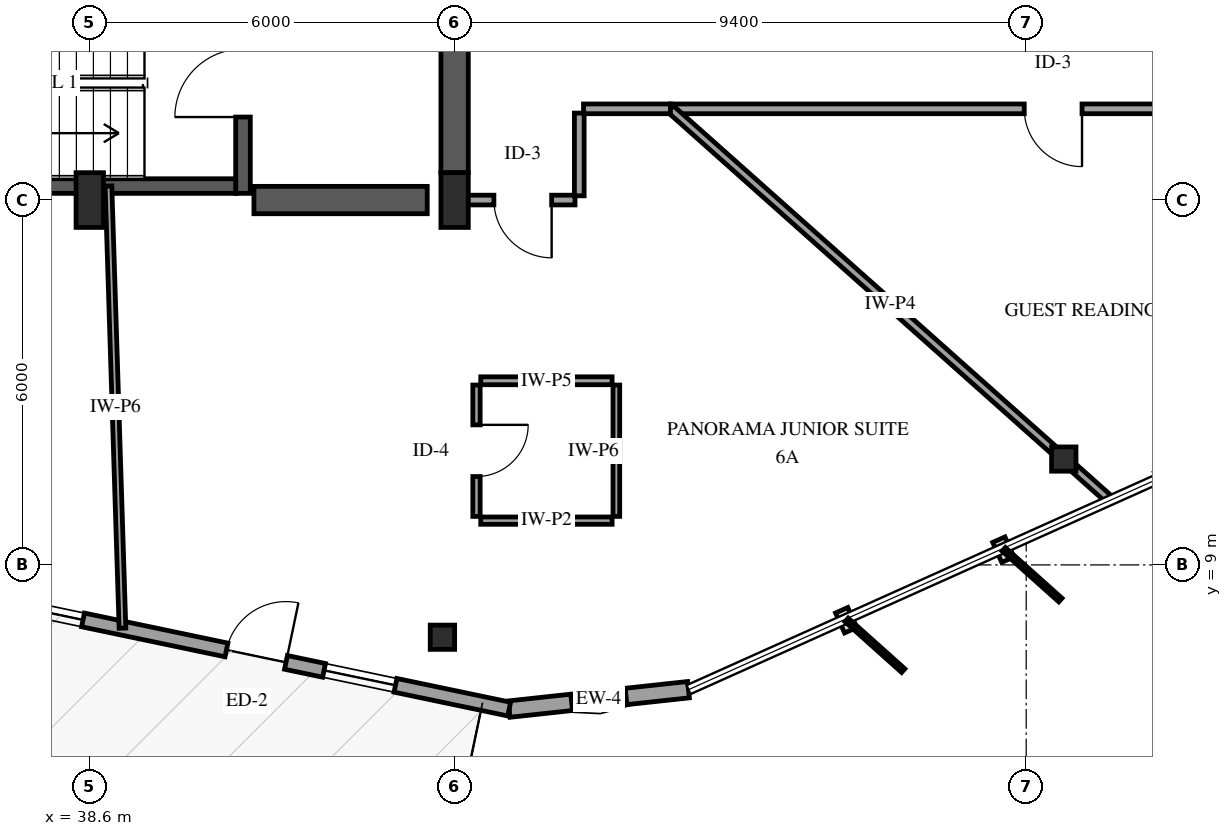
"""IFC4 building model, lengths in metres.
Left out: names, types, materials, properties, quantities, classifications, styles, units other than length and angle.
Written with IfcOpenShell. Run it as: python <this file> out.ifc"""

import sys

from ifc_helpers import new_model, si_unit, direction, frame, frame_2d, origin, origin_2d, place, context, subcontext, project, spatial, rectangle, i_section, extrude, element, fill, save


model = new_model("IFC4")
c1 = context("Model", 3, precision=1e-05, world=origin(), true_north=direction((0.0, 1.0)))
c2 = subcontext(c1, "Body", "Model", "MODEL_VIEW")
j1 = project(units=[si_unit("LENGTHUNIT", "METRE"), si_unit("PLANEANGLEUNIT", "RADIAN")], contexts=[c1])
p1 = place(None, origin())
s1 = spatial("IfcSite", under=j1, at=p1, CompositionType="ELEMENT")
p2 = place(p1, origin())
s2 = spatial("IfcBuilding", under=s1, at=p2, CompositionType="ELEMENT")
p3 = place(p2, frame((0.0, 0.0, 253.75)))
s3 = spatial("IfcBuildingStorey", under=s2, at=p3, CompositionType="ELEMENT", Elevation=253.75)
p4 = place(p3, frame((41.12, 15.11, 0.0), z_axis=(0.0, 0.0, 1.0), x_axis=(0.0, 1.0, 0.0)))
e1 = element("IfcWall", 1, at=p4, inside=s3, PredefinedType="SHEAR", context=c2, shape_type="SweptSolid", body=[
    extrude(rectangle(XDim=3.63, YDim=0.24, at=frame_2d((1.815, 0.0))), origin(), (0.0, 0.0, 1.0), 3.75),
])
p5 = place(p4, frame((1.255, 0.0, 0.0)))
e2 = element("IfcOpeningElement", 2, at=p5, cuts=e1, PredefinedType="OPENING", context=c2, shape_type="SweptSolid", body=[
    extrude(rectangle(XDim=1.12, YDim=2.15, at=frame_2d((0.56, 1.075))), frame((0.0, 0.13, 0.0), z_axis=(0.0, -1.0, 0.0), x_axis=(1.0, 0.0, 0.0)), (0.0, 0.0, 1.0), 0.26),
])
p6 = place(p3, frame((33.0, 15.23, 0.0), z_axis=(0.0, 0.0, 1.0), x_axis=(1.0, 0.0, 0.0)))
e3 = element("IfcWall", 3, at=p6, inside=s3, PredefinedType="SHEAR", context=c2, shape_type="SweptSolid", body=[
    extrude(rectangle(XDim=8.0, YDim=0.24, at=frame_2d((4.0, 0.0))), origin(), (0.0, 0.0, 1.0), 3.75),
])
p7 = place(p3, frame((41.3, 15.0, 0.0), z_axis=(0.0, 0.0, 1.0), x_axis=(1.0, 0.0, 0.0)))
e4 = element("IfcWall", 4, at=p7, inside=s3, PredefinedType="SHEAR", context=c2, shape_type="SweptSolid", body=[
    extrude(rectangle(XDim=2.85, YDim=0.45, at=frame_2d((1.425, 0.0))), origin(), (0.0, 0.0, 1.0), 3.75),
])
p8 = place(p3, frame((44.6, 15.45, 0.0), z_axis=(0.0, 0.0, 1.0), x_axis=(0.0, 1.0, 0.0)))
e5 = element("IfcWall", 5, at=p8, inside=s3, PredefinedType="SHEAR", context=c2, shape_type="SweptSolid", body=[
    extrude(rectangle(XDim=6.35, YDim=0.45, at=frame_2d((3.175, 0.0))), origin(), (0.0, 0.0, 1.0), 3.75),
])
for number, where, z_axis, x_axis in (
    (6, (38.6, 15.0, 0.0), (0.0, 0.0, 1.0), (1.0, 0.0, 0.0)),
    (7, (44.6, 15.0, 0.0), (0.0, 0.0, 1.0), (1.0, 0.0, 0.0)),
):
    element("IfcColumn", number, at=place(p3, frame(where, z_axis=z_axis, x_axis=x_axis)), inside=s3, PredefinedType="PILASTER", context=c2, shape_type="SweptSolid", body=[
        extrude(rectangle(XDim=0.45, YDim=0.9, at=origin_2d()), origin(), (0.0, 0.0, 1.0), 3.75),
    ])
for number, where, z_axis, x_axis in (
    (8, (44.4, 7.811, 0.0), (0.0, 0.0, 1.0), (1.0, 0.0, 0.0)),
    (9, (54.618, 10.74, 0.0), (0.0, 0.0, 1.0), (1.0, 0.0, 0.0)),
):
    element("IfcColumn", number, at=place(p3, frame(where, z_axis=z_axis, x_axis=x_axis)), inside=s3, PredefinedType="COLUMN", context=c2, shape_type="SweptSolid", body=[
        extrude(i_section(OverallWidth=0.401, OverallDepth=0.399, WebThickness=0.025, FlangeThickness=0.04, FilletRadius=0.038, at=origin_2d()), origin(), (0.0, 0.0, 1.0), 3.75),
    ])
p9 = place(p3, frame((45.497, 6.629, 0.0), z_axis=(0.0, 0.0, 1.0), x_axis=(0.994188969029, 0.107648938037, 0.0)))
e10 = element("IfcWall", 10, at=p9, inside=s3, PredefinedType="SOLIDWALL", context=c2, shape_type="SweptSolid", body=[
    extrude(rectangle(XDim=2.967, YDim=0.27, at=frame_2d((1.483, 0.0))), origin(), (0.0, 0.0, 1.0), 2.829),
])
p10 = place(p9, frame((1.033, 0.0, 0.75)))
e11 = element("IfcOpeningElement", 11, at=p10, cuts=e10, PredefinedType="OPENING", context=c2, shape_type="SweptSolid", body=[
    extrude(rectangle(XDim=0.9, YDim=1.5, at=frame_2d((0.45, 0.75))), frame((0.0, 0.145, 0.0), z_axis=(0.0, -1.0, 0.0), x_axis=(1.0, 0.0, 0.0)), (0.0, 0.0, 1.0), 0.29),
])
p11 = place(p3, frame((37.178, 8.37, 0.0), z_axis=(0.0, 0.0, 1.0), x_axis=(0.978792902195, -0.204852275096, 0.0)))
e12 = element("IfcWall", 12, at=p11, inside=s3, PredefinedType="SOLIDWALL", context=c2, shape_type="SweptSolid", body=[
    extrude(rectangle(XDim=8.5, YDim=0.23, at=frame_2d((4.25, 0.0))), origin(), (0.0, 0.0, 1.0), 2.829),
])
p12 = place(p11, frame((3.75, 0.0, 0.0)))
e13 = element("IfcOpeningElement", 13, at=p12, cuts=e12, PredefinedType="OPENING", context=c2, shape_type="SweptSolid", body=[
    extrude(rectangle(XDim=1.0, YDim=2.15, at=frame_2d((0.5, 1.075))), frame((0.0, 0.125, 0.0), z_axis=(0.0, -1.0, 0.0), x_axis=(1.0, 0.0, 0.0)), (0.0, 0.0, 1.0), 0.25),
])
p13 = place(p11, frame((0.44, 0.0, 0.72)))
e14 = element("IfcOpeningElement", 14, at=p13, cuts=e12, PredefinedType="OPENING", context=c2, shape_type="SweptSolid", body=[
    extrude(rectangle(XDim=0.9, YDim=1.5, at=frame_2d((0.45, 0.75))), frame((0.0, 0.125, 0.0), z_axis=(0.0, -1.0, 0.0), x_axis=(1.0, 0.0, 0.0)), (0.0, 0.0, 1.0), 0.25),
])
p14 = place(p11, frame((5.39, 0.0, 0.72)))
e15 = element("IfcOpeningElement", 15, at=p14, cuts=e12, PredefinedType="OPENING", context=c2, shape_type="SweptSolid", body=[
    extrude(rectangle(XDim=1.2, YDim=1.6, at=frame_2d((0.6, 0.8))), frame((0.0, 0.125, 0.0), z_axis=(0.0, -1.0, 0.0), x_axis=(1.0, 0.0, 0.0)), (0.0, 0.0, 1.0), 0.25),
])
p15 = place(p3, frame((60.737, 16.5, 0.0), z_axis=(0.0, 0.0, 1.0), x_axis=(-1.0, 0.0, 0.0)))
e16 = element("IfcWall", 16, at=p15, inside=s3, PredefinedType="PARTITIONING", context=c2, shape_type="SweptSolid", body=[
    extrude(rectangle(XDim=12.588, YDim=0.16, at=frame_2d((6.294, 0.0))), origin(), (0.0, 0.0, 1.0), 3.45),
])
p16 = place(p15, frame((5.819, 0.0, 0.0)))
e17 = element("IfcOpeningElement", 17, at=p16, cuts=e16, PredefinedType="OPENING", context=c2, shape_type="SweptSolid", body=[
    extrude(rectangle(XDim=0.95, YDim=2.15, at=frame_2d((0.475, 1.075))), frame((0.0, 0.09, 0.0), z_axis=(0.0, -1.0, 0.0), x_axis=(1.0, 0.0, 0.0)), (0.0, 0.0, 1.0), 0.18),
])
p17 = place(p3, frame((48.149, 16.5, 0.0), z_axis=(0.0, 0.0, 1.0), x_axis=(0.74692778728, -0.664905166613, 0.0)))
e18 = element("IfcWall", 18, at=p17, inside=s3, PredefinedType="PARTITIONING", context=c2, shape_type="SweptSolid", body=[
    extrude(rectangle(XDim=9.683, YDim=0.14, at=frame_2d((4.841, 0.0))), origin(), (0.0, 0.0, 1.0), 2.828),
])
p18 = place(p3, frame((38.908, 15.23, 0.0), z_axis=(0.0, 0.0, 1.0), x_axis=(0.031618275785, -0.999500017327, 0.0)))
e19 = element("IfcWall", 19, at=p18, inside=s3, PredefinedType="PARTITIONING", context=c2, shape_type="SweptSolid", body=[
    extrude(rectangle(XDim=7.274, YDim=0.11, at=frame_2d((3.637, 0.0))), origin(), (0.0, 0.0, 1.0), 3.45),
])
p19 = place(p3, frame((44.96, 11.958, 0.0), z_axis=(0.0, 0.0, 1.0), x_axis=(0.0, -1.0, 0.0)))
e20 = element("IfcWall", 20, at=p19, inside=s3, PredefinedType="PARTITIONING", context=c2, shape_type="SweptSolid", body=[
    extrude(rectangle(XDim=2.16, YDim=0.12, at=frame_2d((1.08, 0.0))), origin(), (0.0, 0.0, 1.0), 2.828),
])
p20 = place(p19, frame((0.655, 0.0, 0.0)))
e21 = element("IfcOpeningElement", 21, at=p20, cuts=e20, PredefinedType="OPENING", context=c2, shape_type="SweptSolid", body=[
    extrude(rectangle(XDim=0.85, YDim=2.1, at=frame_2d((0.425, 1.05))), frame((0.0, 0.07, 0.0), z_axis=(0.0, -1.0, 0.0), x_axis=(1.0, 0.0, 0.0)), (0.0, 0.0, 1.0), 0.14),
])
p21 = place(p3, frame((47.26, 9.798, 0.0), z_axis=(0.0, 0.0, 1.0), x_axis=(0.0, 1.0, 0.0)))
e22 = element("IfcWall", 22, at=p21, inside=s3, PredefinedType="PARTITIONING", context=c2, shape_type="SweptSolid", body=[
    extrude(rectangle(XDim=2.16, YDim=0.11, at=frame_2d((1.08, 0.0))), origin(), (0.0, 0.0, 1.0), 3.45),
])
p22 = place(p3, frame((47.19, 12.028, 0.0), z_axis=(0.0, 0.0, 1.0), x_axis=(-1.0, 0.0, 0.0)))
e23 = element("IfcWall", 23, at=p22, inside=s3, PredefinedType="PARTITIONING", context=c2, shape_type="SweptSolid", body=[
    extrude(rectangle(XDim=2.16, YDim=0.13, at=frame_2d((1.08, 0.0))), origin(), (0.0, 0.0, 1.0), 3.45),
])
p23 = place(p3, frame((45.03, 9.728, 0.0), z_axis=(0.0, 0.0, 1.0), x_axis=(1.0, 0.0, 0.0)))
e24 = element("IfcWall", 24, at=p23, inside=s3, PredefinedType="PARTITIONING", context=c2, shape_type="SweptSolid", body=[
    extrude(rectangle(XDim=2.16, YDim=0.12, at=frame_2d((1.08, 0.0))), origin(), (0.0, 0.0, 1.0), 3.45),
])
p24 = place(p3, frame((46.58, 15.0, 0.0), z_axis=(0.0, 0.0, 1.0), x_axis=(-1.0, 0.0, 0.0)))
e25 = element("IfcWall", 25, at=p24, inside=s3, PredefinedType="PARTITIONING", context=c2, shape_type="SweptSolid", body=[
    extrude(rectangle(XDim=1.91, YDim=0.16, at=frame_2d((0.955, 0.0))), origin(), (0.0, 0.0, 1.0), 3.45),
])
p25 = place(p24, frame((0.384, 0.0, 0.0)))
e26 = element("IfcOpeningElement", 26, at=p25, cuts=e25, PredefinedType="OPENING", context=c2, shape_type="SweptSolid", body=[
    extrude(rectangle(XDim=0.95, YDim=2.15, at=frame_2d((0.475, 1.075))), frame((0.0, 0.09, 0.0), z_axis=(0.0, -1.0, 0.0), x_axis=(1.0, 0.0, 0.0)), (0.0, 0.0, 1.0), 0.18),
])
p26 = place(p3, frame((48.149, 16.5, 0.0), z_axis=(0.0, 0.0, 1.0), x_axis=(-1.0, 0.0, 0.0)))
e27 = element("IfcWall", 27, at=p26, inside=s3, PredefinedType="PARTITIONING", context=c2, shape_type="SweptSolid", body=[
    extrude(rectangle(XDim=1.429, YDim=0.16, at=frame_2d((0.714, 0.0))), origin(), (0.0, 0.0, 1.0), 3.45),
])
p27 = place(p3, frame((46.65, 16.43, 0.0), z_axis=(0.0, 0.0, 1.0), x_axis=(0.0, -1.0, 0.0)))
e28 = element("IfcWall", 28, at=p27, inside=s3, PredefinedType="PARTITIONING", context=c2, shape_type="SweptSolid", body=[
    extrude(rectangle(XDim=1.36, YDim=0.16, at=frame_2d((0.68, 0.0))), origin(), (0.0, 0.0, 1.0), 3.45),
])
p28 = place(p10, origin())
e29 = element("IfcWindow", 29, at=p28, inside=s3, PartitioningType="SINGLE_PANEL", PredefinedType="WINDOW", context=c2, shape_type="SweptSolid", body=[
    extrude(rectangle(XDim=0.9, YDim=1.5, at=frame_2d((0.45, 0.75))), frame((0.0, 0.03, 0.0), z_axis=(0.0, -1.0, 0.0), x_axis=(1.0, 0.0, 0.0)), (0.0, 0.0, 1.0), 0.06),
])
fill(e11, e29)
p29 = place(p12, origin())
e30 = element("IfcDoor", 30, at=p29, inside=s3, OperationType="SINGLE_SWING_RIGHT", PredefinedType="DOOR", context=c2, shape_type="SweptSolid", body=[
    extrude(rectangle(XDim=1.0, YDim=2.15, at=frame_2d((0.5, 1.075))), frame((0.0, 0.025, 0.0), z_axis=(0.0, -1.0, 0.0), x_axis=(1.0, 0.0, 0.0)), (0.0, 0.0, 1.0), 0.05),
])
fill(e13, e30)
p30 = place(p13, origin())
e31 = element("IfcWindow", 31, at=p30, inside=s3, PartitioningType="SINGLE_PANEL", PredefinedType="WINDOW", context=c2, shape_type="SweptSolid", body=[
    extrude(rectangle(XDim=0.9, YDim=1.5, at=frame_2d((0.45, 0.75))), frame((0.0, 0.03, 0.0), z_axis=(0.0, -1.0, 0.0), x_axis=(1.0, 0.0, 0.0)), (0.0, 0.0, 1.0), 0.06),
])
fill(e14, e31)
p31 = place(p14, origin())
e32 = element("IfcWindow", 32, at=p31, inside=s3, PartitioningType="SINGLE_PANEL", PredefinedType="WINDOW", context=c2, shape_type="SweptSolid", body=[
    extrude(rectangle(XDim=1.2, YDim=1.6, at=frame_2d((0.6, 0.8))), frame((0.0, 0.03, 0.0), z_axis=(0.0, -1.0, 0.0), x_axis=(1.0, 0.0, 0.0)), (0.0, 0.0, 1.0), 0.06),
])
fill(e15, e32)
p32 = place(p5, origin())
e33 = element("IfcDoor", 33, at=p32, inside=s3, OperationType="SINGLE_SWING_LEFT", PredefinedType="DOOR", context=c2, shape_type="SweptSolid", body=[
    extrude(rectangle(XDim=1.12, YDim=2.15, at=frame_2d((0.56, 1.075))), frame((0.0, 0.025, 0.0), z_axis=(0.0, -1.0, 0.0), x_axis=(1.0, 0.0, 0.0)), (0.0, 0.0, 1.0), 0.05),
])
fill(e2, e33)
p33 = place(p16, origin())
e34 = element("IfcDoor", 34, at=p33, inside=s3, OperationType="SINGLE_SWING_LEFT", PredefinedType="DOOR", context=c2, shape_type="SweptSolid", body=[
    extrude(rectangle(XDim=0.95, YDim=2.15, at=frame_2d((0.475, 1.075))), frame((0.0, 0.025, 0.0), z_axis=(0.0, -1.0, 0.0), x_axis=(1.0, 0.0, 0.0)), (0.0, 0.0, 1.0), 0.05),
])
fill(e17, e34)
p34 = place(p20, origin())
e35 = element("IfcDoor", 35, at=p34, inside=s3, OperationType="SINGLE_SWING_LEFT", PredefinedType="DOOR", context=c2, shape_type="SweptSolid", body=[
    extrude(rectangle(XDim=0.85, YDim=2.1, at=frame_2d((0.425, 1.05))), frame((0.0, 0.025, 0.0), z_axis=(0.0, -1.0, 0.0), x_axis=(1.0, 0.0, 0.0)), (0.0, 0.0, 1.0), 0.05),
])
fill(e21, e35)
p35 = place(p25, origin())
e36 = element("IfcDoor", 36, at=p35, inside=s3, OperationType="SINGLE_SWING_LEFT", PredefinedType="DOOR", context=c2, shape_type="SweptSolid", body=[
    extrude(rectangle(XDim=0.95, YDim=2.15, at=frame_2d((0.475, 1.075))), frame((0.0, 0.025, 0.0), z_axis=(0.0, -1.0, 0.0), x_axis=(1.0, 0.0, 0.0)), (0.0, 0.0, 1.0), 0.05),
])
fill(e26, e36)
save(model, sys.argv[1])
